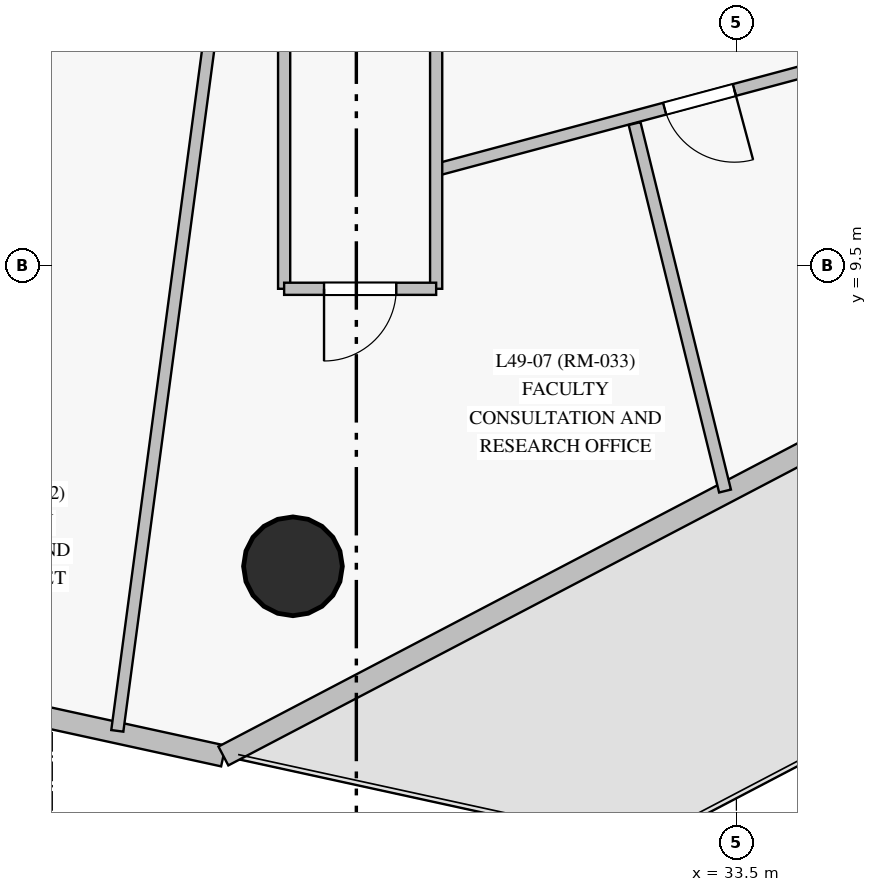
"""IFC4 building model, lengths in metres.
Left out: names, types, materials, properties, quantities, classifications, styles, units other than length and angle.
Written with IfcOpenShell. Run it as: python <this file> out.ifc"""

import sys

from ifc_helpers import new_model, si_unit, direction, frame, frame_2d, origin, origin_with_axes, origin_2d, place, context, subcontext, project, spatial, rectangle, circle, extrude, source, transform, mapped, element, fill, save


model = new_model("IFC4")
c1 = context("Model", 3, precision=1e-05, world=origin(), true_north=direction((0.0, 1.0)))
c2 = subcontext(c1, "Body", "Model", "MODEL_VIEW")
j1 = project(units=[si_unit("LENGTHUNIT", "METRE"), si_unit("PLANEANGLEUNIT", "RADIAN")], contexts=[c1])
p1 = place(None, origin())
s1 = spatial("IfcSite", under=j1, at=p1, CompositionType="ELEMENT")
p2 = place(p1, origin())
s2 = spatial("IfcBuilding", under=s1, at=p2, CompositionType="ELEMENT")
p3 = place(p2, frame((0.0, 0.0, 171.8)))
s3 = spatial("IfcBuildingStorey", under=s2, at=p3, CompositionType="ELEMENT", Elevation=171.8)
m1 = source(origin_with_axes(), c2, "Body", "SweptSolid", [
    extrude(circle(Radius=0.65, at=origin_2d()), origin(), (0.0, 0.0, 1.0), 3.05),
])
p4 = place(p3, frame((27.666, 5.549, 0.0), z_axis=(0.0, 0.0, 1.0), x_axis=(1.0, 0.0, 0.0)))
e1 = element("IfcColumn", 1, at=p4, inside=s3, PredefinedType="COLUMN", context=c2, shape_type="MappedRepresentation", body=[
    mapped(m1, transform((0.0, 0.0, 0.0), scale=1.0)),
])
p5 = place(p3, frame((20.149, 4.495, 0.0), z_axis=(0.0, 0.0, 1.0), x_axis=(0.97698126959, -0.21332510136, 0.0)))
e2 = element("IfcWall", 2, at=p5, inside=s3, PredefinedType="SOLIDWALL", context=c2, shape_type="SweptSolid", body=[
    extrude(rectangle(XDim=6.757, YDim=0.28, at=frame_2d((3.378, 0.0))), origin(), (0.0, 0.0, 1.0), 2.825),
])
p6 = place(p5, frame((2.24, 0.0, 0.85)))
e3 = element("IfcOpeningElement", 3, at=p6, cuts=e2, PredefinedType="OPENING", context=c2, shape_type="SweptSolid", body=[
    extrude(rectangle(XDim=1.75, YDim=1.65, at=frame_2d((0.875, 0.825))), frame((0.0, 0.15, 0.0), z_axis=(0.0, -1.0, 0.0), x_axis=(1.0, 0.0, 0.0)), (0.0, 0.0, 1.0), 0.3),
])
p7 = place(p3, frame((26.751, 3.054, 0.0), z_axis=(0.0, 0.0, 1.0), x_axis=(0.885874198796, 0.463925537029, 0.0)))
e4 = element("IfcWall", 4, at=p7, inside=s3, PredefinedType="SOLIDWALL", context=c2, shape_type="SweptSolid", body=[
    extrude(rectangle(XDim=17.919, YDim=0.28, at=frame_2d((8.96, 0.0))), origin(), (0.0, 0.0, 1.0), 2.495),
])
p8 = place(p7, frame((9.181, 0.0, 0.0)))
e5 = element("IfcOpeningElement", 5, at=p8, cuts=e4, PredefinedType="OPENING", context=c2, shape_type="SweptSolid", body=[
    extrude(rectangle(XDim=1.05, YDim=2.12, at=frame_2d((0.525, 1.06))), frame((0.0, 0.15, 0.0), z_axis=(0.0, -1.0, 0.0), x_axis=(1.0, 0.0, 0.0)), (0.0, 0.0, 1.0), 0.3),
])
p9 = place(p3, frame((26.956, 15.38, 0.0), z_axis=(0.0, 0.0, 1.0), x_axis=(-0.132261506649, -0.991214857566, 0.0)))
e6 = element("IfcWall", 6, at=p9, inside=s3, PredefinedType="PARTITIONING", context=c2, shape_type="SweptSolid", body=[
    extrude(rectangle(XDim=12.102, YDim=0.16, at=frame_2d((6.051, 0.0))), origin(), (0.0, 0.0, 1.0), 2.275),
])
p10 = place(p3, frame((24.727, 15.378, 0.0), z_axis=(0.0, 0.0, 1.0), x_axis=(-0.316403784932, -0.948624606934, 0.0)))
e7 = element("IfcWall", 7, at=p10, inside=s3, PredefinedType="PARTITIONING", context=c2, shape_type="SweptSolid", body=[
    extrude(rectangle(XDim=11.651, YDim=0.16, at=frame_2d((5.825, 0.0))), origin(), (0.0, 0.0, 1.0), 2.825),
])
p11 = place(p3, frame((36.509, 12.629, 0.0), z_axis=(0.0, 0.0, 1.0), x_axis=(-0.965925605542, -0.258819868939, 0.0)))
e8 = element("IfcWall", 8, at=p11, inside=s3, PredefinedType="PARTITIONING", context=c2, shape_type="SweptSolid", body=[
    extrude(rectangle(XDim=7.234, YDim=0.16, at=frame_2d((3.617, 0.0))), origin(), (0.0, 0.0, 1.0), 2.275),
])
p12 = place(p11, frame((3.142, 0.0, 0.0)))
e9 = element("IfcOpeningElement", 9, at=p12, cuts=e8, PredefinedType="OPENING", context=c2, shape_type="SweptSolid", body=[
    extrude(rectangle(XDim=0.95, YDim=2.15, at=frame_2d((0.475, 1.075))), frame((0.0, 0.09, 0.0), z_axis=(0.0, -1.0, 0.0), x_axis=(1.0, 0.0, 0.0)), (0.0, 0.0, 1.0), 0.18),
])
p13 = place(p3, frame((29.55, 15.35, 0.0), z_axis=(0.0, 0.0, 1.0), x_axis=(0.0, -1.0, 0.0)))
e10 = element("IfcWall", 10, at=p13, inside=s3, PredefinedType="PARTITIONING", context=c2, shape_type="SweptSolid", body=[
    extrude(rectangle(XDim=6.15, YDim=0.16, at=frame_2d((3.075, 0.0))), origin(), (0.0, 0.0, 1.0), 2.825),
])
p14 = place(p3, frame((27.55, 9.2, 0.0), z_axis=(0.0, 0.0, 1.0), x_axis=(0.0, 1.0, 0.0)))
e11 = element("IfcWall", 11, at=p14, inside=s3, PredefinedType="PARTITIONING", context=c2, shape_type="SweptSolid", body=[
    extrude(rectangle(XDim=6.15, YDim=0.16, at=frame_2d((3.075, 0.0))), origin(), (0.0, 0.0, 1.0), 2.275),
])
p15 = place(p3, frame((32.161, 11.374, 0.0), z_axis=(0.0, 0.0, 1.0), x_axis=(0.238968541019, -0.971027309813, 0.0)))
e12 = element("IfcWall", 12, at=p15, inside=s3, PredefinedType="PARTITIONING", context=c2, shape_type="SweptSolid", body=[
    extrude(rectangle(XDim=4.979, YDim=0.16, at=frame_2d((2.489, 0.0))), origin(), (0.0, 0.0, 1.0), 2.825),
])
p16 = place(p3, frame((29.55, 9.2, 0.0), z_axis=(0.0, 0.0, 1.0), x_axis=(-1.0, 0.0, 0.0)))
e13 = element("IfcWall", 13, at=p16, inside=s3, PredefinedType="PARTITIONING", context=c2, shape_type="SweptSolid", body=[
    extrude(rectangle(XDim=2.0, YDim=0.16, at=frame_2d((1.0, 0.0))), origin(), (0.0, 0.0, 1.0), 2.495),
])
p17 = place(p16, frame((0.525, 0.0, 0.0)))
e14 = element("IfcOpeningElement", 14, at=p17, cuts=e13, PredefinedType="OPENING", context=c2, shape_type="SweptSolid", body=[
    extrude(rectangle(XDim=0.95, YDim=2.15, at=frame_2d((0.475, 1.075))), frame((0.0, 0.09, 0.0), z_axis=(0.0, -1.0, 0.0), x_axis=(1.0, 0.0, 0.0)), (0.0, 0.0, 1.0), 0.18),
])
m2 = source(origin_with_axes(), c2, "Body", "SweptSolid", [
    extrude(rectangle(XDim=0.95, YDim=2.15, at=frame_2d((0.475, 1.075))), frame((0.0, 0.025, 0.0), z_axis=(0.0, -1.0, 0.0), x_axis=(1.0, 0.0, 0.0)), (0.0, 0.0, 1.0), 0.05),
])
p18 = place(p17, origin())
e15 = element("IfcDoor", 15, at=p18, inside=s3, OperationType="SINGLE_SWING_RIGHT", PredefinedType="DOOR", context=c2, shape_type="MappedRepresentation", body=[
    mapped(m2, transform((0.0, 0.0, 0.0), scale=1.0)),
])
fill(e14, e15)
p19 = place(p12, origin())
e16 = element("IfcDoor", 16, at=p19, inside=s3, OperationType="SINGLE_SWING_LEFT", PredefinedType="DOOR", context=c2, shape_type="MappedRepresentation", body=[
    mapped(m2, transform((0.0, 0.0, 0.0), scale=1.0)),
])
fill(e9, e16)
save(model, sys.argv[1])
